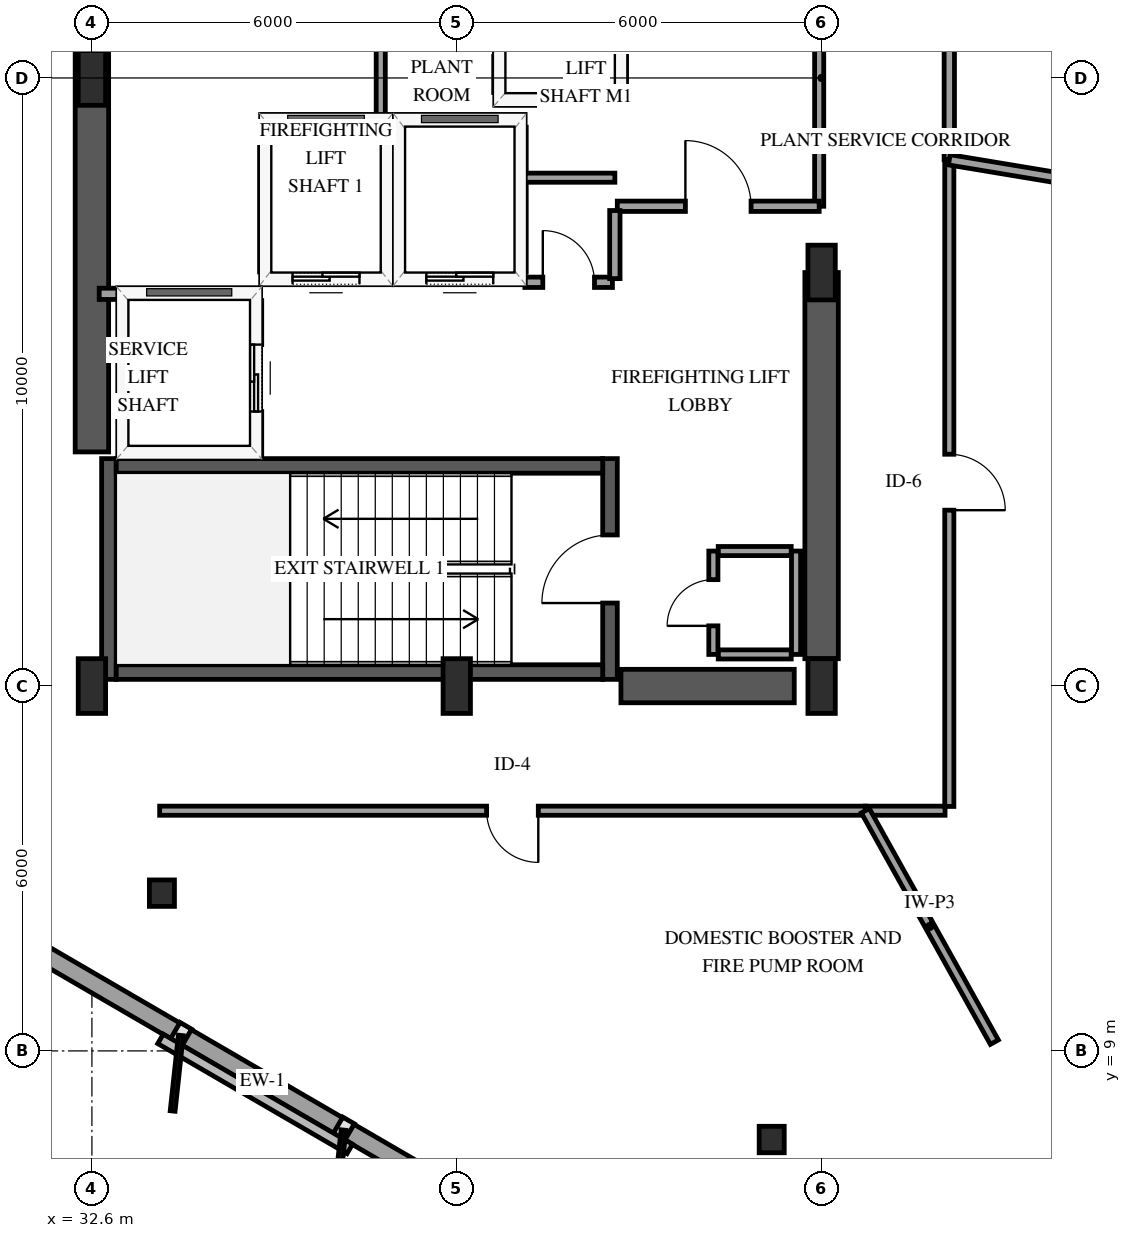
"""IFC4 building model, lengths in metres.
Left out: names, types, materials, properties, quantities, classifications, styles, units other than length and angle.
Written with IfcOpenShell. Run it as: python <this file> out.ifc"""

import sys

from ifc_helpers import new_model, si_unit, direction, frame, frame_2d, origin, origin_2d, place, context, subcontext, project, spatial, rectangle, i_section, extrude, element, fill, save


model = new_model("IFC4")
c1 = context("Model", 3, precision=1e-05, world=origin(), true_north=direction((0.0, 1.0)))
c2 = subcontext(c1, "Body", "Model", "MODEL_VIEW")
j1 = project(units=[si_unit("LENGTHUNIT", "METRE"), si_unit("PLANEANGLEUNIT", "RADIAN")], contexts=[c1])
p1 = place(None, origin())
s1 = spatial("IfcSite", under=j1, at=p1, CompositionType="ELEMENT")
p2 = place(p1, origin())
s2 = spatial("IfcBuilding", under=s1, at=p2, CompositionType="ELEMENT")
p3 = place(p2, frame((0.0, 0.0, 185.8)))
s3 = spatial("IfcBuildingStorey", under=s2, at=p3, CompositionType="ELEMENT", Elevation=185.8)
p4 = place(p3, frame((32.88, 15.11, 0.0), z_axis=(0.0, 0.0, 1.0), x_axis=(0.0, 1.0, 0.0)))
e1 = element("IfcWall", 1, at=p4, inside=s3, PredefinedType="SHEAR", context=c2, shape_type="SweptSolid", body=[
    extrude(rectangle(XDim=3.63, YDim=0.24, at=frame_2d((1.815, 0.0))), origin(), (0.0, 0.0, 1.0), 4.8),
])
p5 = place(p3, frame((41.12, 15.11, 0.0), z_axis=(0.0, 0.0, 1.0), x_axis=(0.0, 1.0, 0.0)))
e2 = element("IfcWall", 2, at=p5, inside=s3, PredefinedType="SHEAR", context=c2, shape_type="SweptSolid", body=[
    extrude(rectangle(XDim=3.63, YDim=0.24, at=frame_2d((1.815, 0.0))), origin(), (0.0, 0.0, 1.0), 4.8),
])
p6 = place(p5, frame((1.255, 0.0, 0.0)))
e3 = element("IfcOpeningElement", 3, at=p6, cuts=e2, PredefinedType="OPENING", context=c2, shape_type="SweptSolid", body=[
    extrude(rectangle(XDim=1.12, YDim=2.15, at=frame_2d((0.56, 1.075))), frame((0.0, 0.13, 0.0), z_axis=(0.0, -1.0, 0.0), x_axis=(1.0, 0.0, 0.0)), (0.0, 0.0, 1.0), 0.26),
])
for number, where, z_axis, x_axis in (
    (4, (33.0, 15.23, 0.0), (0.0, 0.0, 1.0), (1.0, 0.0, 0.0)),
    (5, (33.0, 18.62, 0.0), (0.0, 0.0, 1.0), (1.0, 0.0, 0.0)),
):
    element("IfcWall", number, at=place(p3, frame(where, z_axis=z_axis, x_axis=x_axis)), inside=s3, PredefinedType="SHEAR", context=c2, shape_type="SweptSolid", body=[
        extrude(rectangle(XDim=8.0, YDim=0.24, at=frame_2d((4.0, 0.0))), origin(), (0.0, 0.0, 1.0), 4.8),
    ])
p7 = place(p3, frame((32.6, 18.85, 0.0), z_axis=(0.0, 0.0, 1.0), x_axis=(0.0, 1.0, 0.0)))
e6 = element("IfcWall", 6, at=p7, inside=s3, PredefinedType="SHEAR", context=c2, shape_type="SweptSolid", body=[
    extrude(rectangle(XDim=12.3, YDim=0.55, at=frame_2d((6.15, 0.0))), origin(), (0.0, 0.0, 1.0), 4.8),
])
p8 = place(p3, frame((41.3, 15.0, 0.0), z_axis=(0.0, 0.0, 1.0), x_axis=(1.0, 0.0, 0.0)))
e7 = element("IfcWall", 7, at=p8, inside=s3, PredefinedType="SHEAR", context=c2, shape_type="SweptSolid", body=[
    extrude(rectangle(XDim=2.85, YDim=0.55, at=frame_2d((1.425, 0.0))), origin(), (0.0, 0.0, 1.0), 4.8),
])
p9 = place(p3, frame((44.6, 15.45, 0.0), z_axis=(0.0, 0.0, 1.0), x_axis=(0.0, 1.0, 0.0)))
e8 = element("IfcWall", 8, at=p9, inside=s3, PredefinedType="SHEAR", context=c2, shape_type="SweptSolid", body=[
    extrude(rectangle(XDim=6.35, YDim=0.55, at=frame_2d((3.175, 0.0))), origin(), (0.0, 0.0, 1.0), 4.8),
])
for number, where, z_axis, x_axis in (
    (9, (32.6, 15.0, 0.0), (0.0, 0.0, 1.0), (1.0, 0.0, 0.0)),
    (10, (32.6, 25.0, 0.0), (0.0, 0.0, 1.0), (1.0, 0.0, 0.0)),
    (11, (38.6, 15.0, 0.0), (0.0, 0.0, 1.0), (1.0, 0.0, 0.0)),
    (12, (44.6, 15.0, 0.0), (0.0, 0.0, 1.0), (1.0, 0.0, 0.0)),
    (13, (44.6, 21.8, 0.0), (0.0, 0.0, 1.0), (1.0, 0.0, 0.0)),
):
    element("IfcColumn", number, at=place(p3, frame(where, z_axis=z_axis, x_axis=x_axis)), inside=s3, PredefinedType="PILASTER", context=c2, shape_type="SweptSolid", body=[
        extrude(rectangle(XDim=0.45, YDim=0.9, at=origin_2d()), origin(), (0.0, 0.0, 1.0), 4.5),
    ])
for number, where, z_axis, x_axis in (
    (14, (33.751, 11.594, 0.0), (0.0, 0.0, 1.0), (1.0, 0.0, 0.0)),
    (15, (43.779, 7.542, 0.0), (0.0, 0.0, 1.0), (1.0, 0.0, 0.0)),
):
    element("IfcColumn", number, at=place(p3, frame(where, z_axis=z_axis, x_axis=x_axis)), inside=s3, PredefinedType="COLUMN", context=c2, shape_type="SweptSolid", body=[
        extrude(i_section(OverallWidth=0.412, OverallDepth=0.435, WebThickness=0.036, FlangeThickness=0.057, FilletRadius=0.038, at=origin_2d()), origin(), (0.0, 0.0, 1.0), 4.5),
    ])
p10 = place(p3, frame((31.388, 10.831, 0.0), z_axis=(0.0, 0.0, 1.0), x_axis=(0.864445551727, -0.502726454544, 0.0)))
e16 = element("IfcWall", 16, at=p10, inside=s3, PredefinedType="SOLIDWALL", context=c2, shape_type="SweptSolid", body=[
    extrude(rectangle(XDim=9.287, YDim=0.3, at=frame_2d((4.644, 0.0))), origin(), (0.0, 0.0, 1.0), 3.879),
])
p11 = place(p3, frame((35.45, 21.7, 0.0), z_axis=(0.0, 0.0, 1.0), x_axis=(1.0, 0.0, 0.0)))
e17 = element("IfcWall", 17, at=p11, inside=s3, PredefinedType="SOLIDWALL", context=c2, shape_type="SweptSolid", body=[
    extrude(rectangle(XDim=2.0, YDim=0.185, at=frame_2d((1.0, 0.0))), origin(), (0.0, 0.0, 1.0), 4.5),
])
p12 = place(p11, frame((0.45, 0.0, 0.0)))
e18 = element("IfcOpeningElement", 18, at=p12, cuts=e17, PredefinedType="OPENING", context=c2, shape_type="SweptSolid", body=[
    extrude(rectangle(XDim=1.1, YDim=2.15, at=frame_2d((0.55, 1.075))), frame((0.0, 0.103, 0.0), z_axis=(0.0, -1.0, 0.0), x_axis=(1.0, 0.0, 0.0)), (0.0, 0.0, 1.0), 0.205),
])
p13 = place(p3, frame((35.45, 24.3, 0.0), z_axis=(0.0, 0.0, 1.0), x_axis=(1.0, 0.0, 0.0)))
e19 = element("IfcWall", 19, at=p13, inside=s3, PredefinedType="SOLIDWALL", context=c2, shape_type="SweptSolid", body=[
    extrude(rectangle(XDim=2.0, YDim=0.185, at=frame_2d((1.0, 0.0))), origin(), (0.0, 0.0, 1.0), 4.5),
])
for number, where, z_axis, x_axis in (
    (20, (35.45, 21.81, 0.0), (0.0, 0.0, 1.0), (0.0, 1.0, 0.0)),
    (21, (37.45, 21.81, 0.0), (0.0, 0.0, 1.0), (0.0, 1.0, 0.0)),
):
    element("IfcWall", number, at=place(p3, frame(where, z_axis=z_axis, x_axis=x_axis)), inside=s3, PredefinedType="SOLIDWALL", context=c2, shape_type="SweptSolid", body=[
        extrude(rectangle(XDim=2.38, YDim=0.185, at=frame_2d((1.19, 0.0))), origin(), (0.0, 0.0, 1.0), 4.5),
    ])
p14 = place(p3, frame((37.65, 21.7, 0.0), z_axis=(0.0, 0.0, 1.0), x_axis=(1.0, 0.0, 0.0)))
e22 = element("IfcWall", 22, at=p14, inside=s3, PredefinedType="SOLIDWALL", context=c2, shape_type="SweptSolid", body=[
    extrude(rectangle(XDim=2.0, YDim=0.185, at=frame_2d((1.0, 0.0))), origin(), (0.0, 0.0, 1.0), 4.5),
])
p15 = place(p14, frame((0.45, 0.0, 0.0)))
e23 = element("IfcOpeningElement", 23, at=p15, cuts=e22, PredefinedType="OPENING", context=c2, shape_type="SweptSolid", body=[
    extrude(rectangle(XDim=1.1, YDim=2.15, at=frame_2d((0.55, 1.075))), frame((0.0, 0.103, 0.0), z_axis=(0.0, -1.0, 0.0), x_axis=(1.0, 0.0, 0.0)), (0.0, 0.0, 1.0), 0.205),
])
p16 = place(p3, frame((37.65, 24.3, 0.0), z_axis=(0.0, 0.0, 1.0), x_axis=(1.0, 0.0, 0.0)))
e24 = element("IfcWall", 24, at=p16, inside=s3, PredefinedType="SOLIDWALL", context=c2, shape_type="SweptSolid", body=[
    extrude(rectangle(XDim=2.0, YDim=0.185, at=frame_2d((1.0, 0.0))), origin(), (0.0, 0.0, 1.0), 4.5),
])
p17 = place(p3, frame((39.65, 21.81, 0.0), z_axis=(0.0, 0.0, 1.0), x_axis=(0.0, 1.0, 0.0)))
e25 = element("IfcWall", 25, at=p17, inside=s3, PredefinedType="SOLIDWALL", context=c2, shape_type="SweptSolid", body=[
    extrude(rectangle(XDim=2.38, YDim=0.185, at=frame_2d((1.19, 0.0))), origin(), (0.0, 0.0, 1.0), 4.5),
])
p18 = place(p3, frame((32.72, 21.45, 0.0), z_axis=(0.0, 0.0, 1.0), x_axis=(1.0, 0.0, 0.0)))
e26 = element("IfcWall", 26, at=p18, inside=s3, PredefinedType="SOLIDWALL", context=c2, shape_type="SweptSolid", body=[
    extrude(rectangle(XDim=2.58, YDim=0.185, at=frame_2d((1.29, 0.0))), origin(), (0.0, 0.0, 1.0), 4.5),
])
p19 = place(p3, frame((35.3, 18.79, 0.0), z_axis=(0.0, 0.0, 1.0), x_axis=(0.0, 1.0, 0.0)))
e27 = element("IfcWall", 27, at=p19, inside=s3, PredefinedType="SOLIDWALL", context=c2, shape_type="SweptSolid", body=[
    extrude(rectangle(XDim=2.55, YDim=0.185, at=frame_2d((1.275, 0.0))), origin(), (0.0, 0.0, 1.0), 4.5),
])
p20 = place(p19, frame((0.725, 0.0, 0.0)))
e28 = element("IfcOpeningElement", 28, at=p20, cuts=e27, PredefinedType="OPENING", context=c2, shape_type="SweptSolid", body=[
    extrude(rectangle(XDim=1.1, YDim=2.15, at=frame_2d((0.55, 1.075))), frame((0.0, 0.103, 0.0), z_axis=(0.0, -1.0, 0.0), x_axis=(1.0, 0.0, 0.0)), (0.0, 0.0, 1.0), 0.205),
])
p21 = place(p3, frame((39.3, 24.65, 0.0), z_axis=(0.0, 0.0, 1.0), x_axis=(1.0, 0.0, 0.0)))
e29 = element("IfcWall", 29, at=p21, inside=s3, PredefinedType="SOLIDWALL", context=c2, shape_type="SweptSolid", body=[
    extrude(rectangle(XDim=2.0, YDim=0.185, at=frame_2d((1.0, 0.0))), origin(), (0.0, 0.0, 1.0), 4.5),
])
for number, where, z_axis, x_axis in (
    (30, (39.3, 24.76, 0.0), (0.0, 0.0, 1.0), (0.0, 1.0, 0.0)),
    (31, (41.3, 24.76, 0.0), (0.0, 0.0, 1.0), (0.0, 1.0, 0.0)),
):
    element("IfcWall", number, at=place(p3, frame(where, z_axis=z_axis, x_axis=x_axis)), inside=s3, PredefinedType="SOLIDWALL", context=c2, shape_type="SweptSolid", body=[
        extrude(rectangle(XDim=2.08, YDim=0.185, at=frame_2d((1.04, 0.0))), origin(), (0.0, 0.0, 1.0), 4.5),
    ])
for number, where, z_axis, x_axis in (
    (32, (42.9, 15.52, 0.0), (0.0, 0.0, 1.0), (1.0, 0.0, 0.0)),
    (33, (42.9, 17.22, 0.0), (0.0, 0.0, 1.0), (1.0, 0.0, 0.0)),
):
    element("IfcWall", number, at=place(p3, frame(where, z_axis=z_axis, x_axis=x_axis)), inside=s3, PredefinedType="PARTITIONING", context=c2, shape_type="SweptSolid", body=[
        extrude(rectangle(XDim=1.2, YDim=0.15, at=frame_2d((0.6, 0.0))), origin(), (0.0, 0.0, 1.0), 4.5),
    ])
p22 = place(p3, frame((44.18, 15.52, 0.0), z_axis=(0.0, 0.0, 1.0), x_axis=(0.0, 1.0, 0.0)))
e34 = element("IfcWall", 34, at=p22, inside=s3, PredefinedType="PARTITIONING", context=c2, shape_type="SweptSolid", body=[
    extrude(rectangle(XDim=1.7, YDim=0.15, at=frame_2d((0.85, 0.0))), origin(), (0.0, 0.0, 1.0), 4.5),
])
p23 = place(p3, frame((42.82, 15.52, 0.0), z_axis=(0.0, 0.0, 1.0), x_axis=(0.0, 1.0, 0.0)))
e35 = element("IfcWall", 35, at=p23, inside=s3, PredefinedType="PARTITIONING", context=c2, shape_type="SweptSolid", body=[
    extrude(rectangle(XDim=1.7, YDim=0.15, at=frame_2d((0.85, 0.0))), origin(), (0.0, 0.0, 1.0), 4.5),
])
p24 = place(p23, frame((0.47, 0.0, 0.0)))
e36 = element("IfcOpeningElement", 36, at=p24, cuts=e35, PredefinedType="OPENING", context=c2, shape_type="SweptSolid", body=[
    extrude(rectangle(XDim=0.76, YDim=2.0, at=frame_2d((0.38, 1.0))), frame((0.0, 0.085, 0.0), z_axis=(0.0, -1.0, 0.0), x_axis=(1.0, 0.0, 0.0)), (0.0, 0.0, 1.0), 0.17),
])
p25 = place(p3, frame((46.7, 23.654, 0.0), z_axis=(0.0, 0.0, 1.0), x_axis=(0.0, -1.0, 0.0)))
e37 = element("IfcWall", 37, at=p25, inside=s3, PredefinedType="PARTITIONING", context=c2, shape_type="SweptSolid", body=[
    extrude(rectangle(XDim=10.634, YDim=0.15, at=frame_2d((5.317, 0.0))), origin(), (0.0, 0.0, 1.0), 4.5),
])
p26 = place(p25, frame((4.842, 0.0, 0.0)))
e38 = element("IfcOpeningElement", 38, at=p26, cuts=e37, PredefinedType="OPENING", context=c2, shape_type="SweptSolid", body=[
    extrude(rectangle(XDim=0.92, YDim=2.12, at=frame_2d((0.46, 1.06))), frame((0.0, 0.085, 0.0), z_axis=(0.0, -1.0, 0.0), x_axis=(1.0, 0.0, 0.0)), (0.0, 0.0, 1.0), 0.17),
])
p27 = place(p3, frame((46.7, 32.293, 0.0), z_axis=(0.0, 0.0, 1.0), x_axis=(0.0, -1.0, 0.0)))
e39 = element("IfcWall", 39, at=p27, inside=s3, PredefinedType="PARTITIONING", context=c2, shape_type="SweptSolid", body=[
    extrude(rectangle(XDim=8.639, YDim=0.17, at=frame_2d((4.319, 0.0))), origin(), (0.0, 0.0, 1.0), 4.5),
])
p28 = place(p27, frame((3.844, 0.0, 0.0)))
e40 = element("IfcOpeningElement", 40, at=p28, cuts=e39, PredefinedType="OPENING", context=c2, shape_type="SweptSolid", body=[
    extrude(rectangle(XDim=0.92, YDim=2.12, at=frame_2d((0.46, 1.06))), frame((0.0, 0.095, 0.0), z_axis=(0.0, -1.0, 0.0), x_axis=(1.0, 0.0, 0.0)), (0.0, 0.0, 1.0), 0.19),
])
p29 = place(p3, frame((44.56, 29.8, 0.0), z_axis=(0.0, 0.0, 1.0), x_axis=(0.0, -1.0, 0.0)))
e41 = element("IfcWall", 41, at=p29, inside=s3, PredefinedType="PARTITIONING", context=c2, shape_type="SweptSolid", body=[
    extrude(rectangle(XDim=6.91, YDim=0.15, at=frame_2d((3.455, 0.0))), origin(), (0.0, 0.0, 1.0), 3.54),
])
p30 = place(p29, frame((2.915, 0.0, 0.0)))
e42 = element("IfcOpeningElement", 42, at=p30, cuts=e41, PredefinedType="OPENING", context=c2, shape_type="SweptSolid", body=[
    extrude(rectangle(XDim=1.08, YDim=2.15, at=frame_2d((0.54, 1.075))), frame((0.0, 0.085, 0.0), z_axis=(0.0, -1.0, 0.0), x_axis=(1.0, 0.0, 0.0)), (0.0, 0.0, 1.0), 0.17),
])
p31 = place(p3, frame((41.24, 22.89, 0.0), z_axis=(0.0, 0.0, 1.0), x_axis=(1.0, 0.0, 0.0)))
e43 = element("IfcWall", 43, at=p31, inside=s3, PredefinedType="PARTITIONING", context=c2, shape_type="SweptSolid", body=[
    extrude(rectangle(XDim=3.32, YDim=0.17, at=frame_2d((1.66, 0.0))), origin(), (0.0, 0.0, 1.0), 4.5),
])
p32 = place(p31, frame((1.12, 0.0, 0.0)))
e44 = element("IfcOpeningElement", 44, at=p32, cuts=e43, PredefinedType="OPENING", context=c2, shape_type="SweptSolid", body=[
    extrude(rectangle(XDim=1.08, YDim=2.15, at=frame_2d((0.54, 1.075))), frame((0.0, 0.095, 0.0), z_axis=(0.0, -1.0, 0.0), x_axis=(1.0, 0.0, 0.0)), (0.0, 0.0, 1.0), 0.19),
])
p33 = place(p3, frame((37.35, 26.88, 0.0), z_axis=(0.0, 0.0, 1.0), x_axis=(0.0, -1.0, 0.0)))
e45 = element("IfcWall", 45, at=p33, inside=s3, PredefinedType="PARTITIONING", context=c2, shape_type="SweptSolid", body=[
    extrude(rectangle(XDim=2.58, YDim=0.15, at=frame_2d((1.29, 0.0))), origin(), (0.0, 0.0, 1.0), 4.5),
])
p34 = place(p3, frame((39.72, 21.64, 0.0), z_axis=(0.0, 0.0, 1.0), x_axis=(1.0, 0.0, 0.0)))
e46 = element("IfcWall", 46, at=p34, inside=s3, PredefinedType="PARTITIONING", context=c2, shape_type="SweptSolid", body=[
    extrude(rectangle(XDim=1.44, YDim=0.17, at=frame_2d((0.72, 0.0))), origin(), (0.0, 0.0, 1.0), 4.5),
])
p35 = place(p34, frame((0.295, 0.0, 0.0)))
e47 = element("IfcOpeningElement", 47, at=p35, cuts=e46, PredefinedType="OPENING", context=c2, shape_type="SweptSolid", body=[
    extrude(rectangle(XDim=0.85, YDim=2.1, at=frame_2d((0.425, 1.05))), frame((0.0, 0.095, 0.0), z_axis=(0.0, -1.0, 0.0), x_axis=(1.0, 0.0, 0.0)), (0.0, 0.0, 1.0), 0.19),
])
p36 = place(p3, frame((46.63, 12.95, 0.0), z_axis=(0.0, 0.0, 1.0), x_axis=(-1.0, 0.0, 0.0)))
e48 = element("IfcWall", 48, at=p36, inside=s3, PredefinedType="PARTITIONING", context=c2, shape_type="SweptSolid", body=[
    extrude(rectangle(XDim=1.311, YDim=0.15, at=frame_2d((0.655, 0.0))), origin(), (0.0, 0.0, 1.0), 4.5),
])
p37 = place(p3, frame((41.2, 21.7, 0.0), z_axis=(0.0, 0.0, 1.0), x_axis=(0.0, 1.0, 0.0)))
e49 = element("IfcWall", 49, at=p37, inside=s3, PredefinedType="PARTITIONING", context=c2, shape_type="SweptSolid", body=[
    extrude(rectangle(XDim=1.12, YDim=0.17, at=frame_2d((0.56, 0.0))), origin(), (0.0, 0.0, 1.0), 4.5),
])
p38 = place(p3, frame((60.768, 21.319, 0.0), z_axis=(0.0, 0.0, 1.0), x_axis=(-0.986504286451, 0.163735435427, 0.0)))
e50 = element("IfcWall", 50, at=p38, inside=s3, PredefinedType="PARTITIONING", context=c2, shape_type="SweptSolid", body=[
    extrude(rectangle(XDim=14.26, YDim=0.17, at=frame_2d((7.13, 0.0))), origin(), (0.0, 0.0, 1.0), 3.874),
])
p39 = place(p3, frame((45.319, 12.95, 0.0), z_axis=(0.0, 0.0, 1.0), x_axis=(-1.0, 0.0, 0.0)))
e51 = element("IfcWall", 51, at=p39, inside=s3, PredefinedType="PARTITIONING", context=c2, shape_type="SweptSolid", body=[
    extrude(rectangle(XDim=11.605, YDim=0.15, at=frame_2d((5.802, 0.0))), origin(), (0.0, 0.0, 1.0), 4.5),
])
p40 = place(p39, frame((5.378, 0.0, 0.0)))
e52 = element("IfcOpeningElement", 52, at=p40, cuts=e51, PredefinedType="OPENING", context=c2, shape_type="SweptSolid", body=[
    extrude(rectangle(XDim=0.85, YDim=2.1, at=frame_2d((0.425, 1.05))), frame((0.0, 0.085, 0.0), z_axis=(0.0, -1.0, 0.0), x_axis=(1.0, 0.0, 0.0)), (0.0, 0.0, 1.0), 0.17),
])
p41 = place(p3, frame((47.441, 9.144, 0.0), z_axis=(0.0, 0.0, 1.0), x_axis=(-0.48694585255, 0.873432159177, 0.0)))
e53 = element("IfcWall", 53, at=p41, inside=s3, PredefinedType="PARTITIONING", context=c2, shape_type="SweptSolid", body=[
    extrude(rectangle(XDim=4.357, YDim=0.15, at=frame_2d((2.179, 0.0))), origin(), (0.0, 0.0, 1.0), 3.874),
])
p42 = place(p3, frame((41.2, 23.36, 0.0), z_axis=(0.0, 0.0, 1.0), x_axis=(-1.0, 0.0, 0.0)))
e54 = element("IfcWall", 54, at=p42, inside=s3, PredefinedType="PARTITIONING", context=c2, shape_type="SweptSolid", body=[
    extrude(rectangle(XDim=1.48, YDim=0.15, at=frame_2d((0.74, 0.0))), origin(), (0.0, 0.0, 1.0), 4.5),
])
p43 = place(p12, origin())
e55 = element("IfcDoor", 55, at=p43, inside=s3, OperationType="SLIDING_TO_LEFT", PredefinedType="DOOR", context=c2, shape_type="SweptSolid", body=[
    extrude(rectangle(XDim=1.1, YDim=2.15, at=frame_2d((0.55, 1.075))), frame((0.0, 0.025, 0.0), z_axis=(0.0, -1.0, 0.0), x_axis=(1.0, 0.0, 0.0)), (0.0, 0.0, 1.0), 0.05),
])
fill(e18, e55)
p44 = place(p15, origin())
e56 = element("IfcDoor", 56, at=p44, inside=s3, OperationType="SLIDING_TO_LEFT", PredefinedType="DOOR", context=c2, shape_type="SweptSolid", body=[
    extrude(rectangle(XDim=1.1, YDim=2.15, at=frame_2d((0.55, 1.075))), frame((0.0, 0.025, 0.0), z_axis=(0.0, -1.0, 0.0), x_axis=(1.0, 0.0, 0.0)), (0.0, 0.0, 1.0), 0.05),
])
fill(e23, e56)
p45 = place(p20, origin())
e57 = element("IfcDoor", 57, at=p45, inside=s3, OperationType="SLIDING_TO_LEFT", PredefinedType="DOOR", context=c2, shape_type="SweptSolid", body=[
    extrude(rectangle(XDim=1.1, YDim=2.15, at=frame_2d((0.55, 1.075))), frame((0.0, 0.025, 0.0), z_axis=(0.0, -1.0, 0.0), x_axis=(1.0, 0.0, 0.0)), (0.0, 0.0, 1.0), 0.05),
])
fill(e28, e57)
p46 = place(p6, origin())
e58 = element("IfcDoor", 58, at=p46, inside=s3, OperationType="SINGLE_SWING_LEFT", PredefinedType="DOOR", context=c2, shape_type="SweptSolid", body=[
    extrude(rectangle(XDim=1.12, YDim=2.15, at=frame_2d((0.56, 1.075))), frame((0.0, 0.025, 0.0), z_axis=(0.0, -1.0, 0.0), x_axis=(1.0, 0.0, 0.0)), (0.0, 0.0, 1.0), 0.05),
])
fill(e3, e58)
p47 = place(p24, origin())
e59 = element("IfcDoor", 59, at=p47, inside=s3, OperationType="SINGLE_SWING_LEFT", PredefinedType="TRAPDOOR", context=c2, shape_type="SweptSolid", body=[
    extrude(rectangle(XDim=0.76, YDim=2.0, at=frame_2d((0.38, 1.0))), frame((0.0, 0.025, 0.0), z_axis=(0.0, -1.0, 0.0), x_axis=(1.0, 0.0, 0.0)), (0.0, 0.0, 1.0), 0.05),
])
fill(e36, e59)
p48 = place(p26, origin())
e60 = element("IfcDoor", 60, at=p48, inside=s3, OperationType="SINGLE_SWING_RIGHT", PredefinedType="DOOR", context=c2, shape_type="SweptSolid", body=[
    extrude(rectangle(XDim=0.92, YDim=2.12, at=frame_2d((0.46, 1.06))), frame((0.0, 0.025, 0.0), z_axis=(0.0, -1.0, 0.0), x_axis=(1.0, 0.0, 0.0)), (0.0, 0.0, 1.0), 0.05),
])
fill(e38, e60)
p49 = place(p32, origin())
e61 = element("IfcDoor", 61, at=p49, inside=s3, OperationType="SINGLE_SWING_LEFT", PredefinedType="DOOR", context=c2, shape_type="SweptSolid", body=[
    extrude(rectangle(XDim=1.08, YDim=2.15, at=frame_2d((0.54, 1.075))), frame((0.0, 0.025, 0.0), z_axis=(0.0, -1.0, 0.0), x_axis=(1.0, 0.0, 0.0)), (0.0, 0.0, 1.0), 0.05),
])
fill(e44, e61)
p50 = place(p35, origin())
e62 = element("IfcDoor", 62, at=p50, inside=s3, OperationType="SINGLE_SWING_LEFT", PredefinedType="DOOR", context=c2, shape_type="SweptSolid", body=[
    extrude(rectangle(XDim=0.85, YDim=2.1, at=frame_2d((0.425, 1.05))), frame((0.0, 0.025, 0.0), z_axis=(0.0, -1.0, 0.0), x_axis=(1.0, 0.0, 0.0)), (0.0, 0.0, 1.0), 0.05),
])
fill(e47, e62)
p51 = place(p40, origin())
e63 = element("IfcDoor", 63, at=p51, inside=s3, OperationType="SINGLE_SWING_LEFT", PredefinedType="DOOR", context=c2, shape_type="SweptSolid", body=[
    extrude(rectangle(XDim=0.85, YDim=2.1, at=frame_2d((0.425, 1.05))), frame((0.0, 0.025, 0.0), z_axis=(0.0, -1.0, 0.0), x_axis=(1.0, 0.0, 0.0)), (0.0, 0.0, 1.0), 0.05),
])
fill(e52, e63)
save(model, sys.argv[1])
